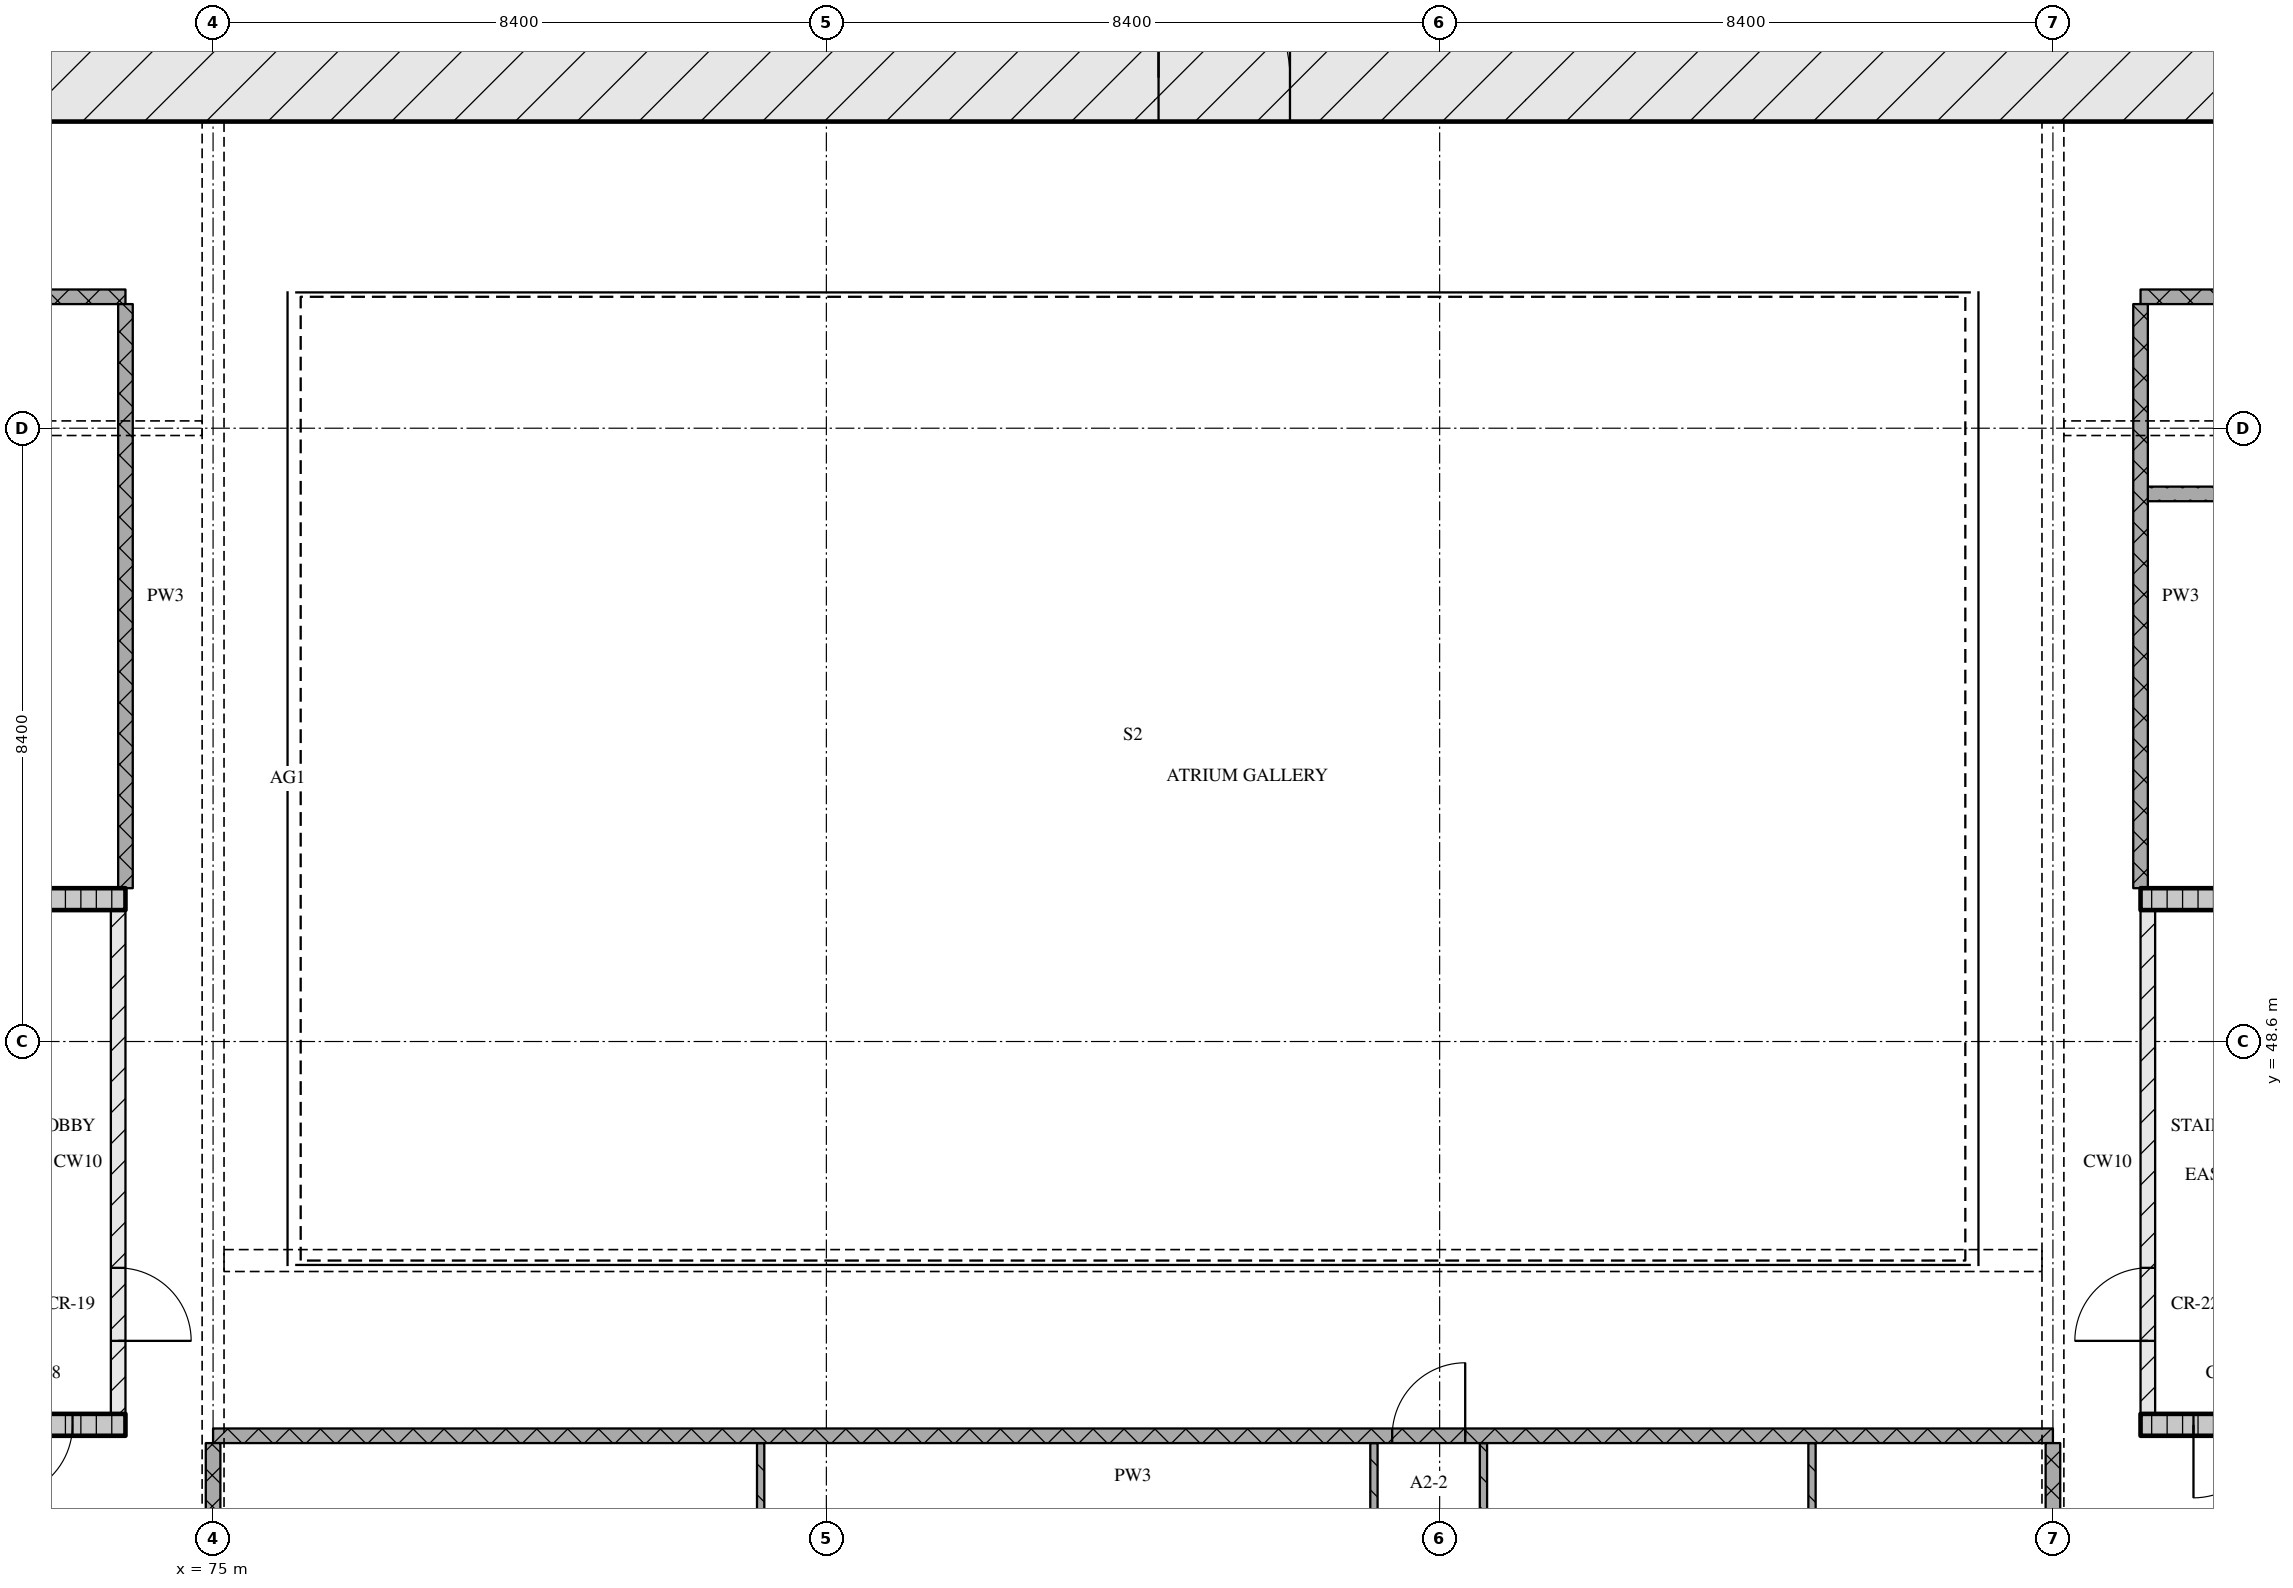
"""IFC4 building model, lengths in metres.
Left out: names, types, materials, properties, quantities, classifications, styles, units other than length and angle.
Written with IfcOpenShell. Run it as: python <this file> out.ifc"""

import sys

from ifc_helpers import new_model, si_unit, direction, frame, frame_2d, origin, place, context, subcontext, project, spatial, rectangle, extrude, element, fill, save


model = new_model("IFC4")
c1 = context("Model", 3, precision=1e-05, world=origin(), true_north=direction((0.0, 1.0)))
c2 = subcontext(c1, "Body", "Model", "MODEL_VIEW")
j1 = project(units=[si_unit("LENGTHUNIT", "METRE"), si_unit("PLANEANGLEUNIT", "RADIAN")], contexts=[c1])
p1 = place(None, origin())
s1 = spatial("IfcSite", under=j1, at=p1, CompositionType="ELEMENT")
p2 = place(p1, origin())
s2 = spatial("IfcBuilding", under=s1, at=p2, CompositionType="ELEMENT")
p3 = place(p2, frame((0.0, 0.0, 55.2)))
s3 = spatial("IfcBuildingStorey", under=s2, at=p3, CompositionType="ELEMENT", Elevation=55.2)
p4 = place(p3, frame((66.6, 61.8, 0.0), z_axis=(0.0, 0.0, 1.0), x_axis=(1.0, 0.0, 0.0)))
e1 = element("IfcWall", 1, at=p4, inside=s3, PredefinedType="SOLIDWALL", context=c2, shape_type="SweptSolid", body=[
    extrude(rectangle(XDim=42.0, YDim=1.2, at=frame_2d((21.0, 0.0))), origin(), (0.0, 0.0, 1.0), 3.32),
])
p5 = place(p4, frame((21.35, 0.0, 0.0)))
e2 = element("IfcOpeningElement", 2, at=p5, cuts=e1, PredefinedType="OPENING", context=c2, shape_type="SweptSolid", body=[
    extrude(rectangle(XDim=1.8, YDim=2.1, at=frame_2d((0.9, 1.05))), frame((0.0, 0.61, 0.0), z_axis=(0.0, -1.0, 0.0), x_axis=(1.0, 0.0, 0.0)), (0.0, 0.0, 1.0), 1.22),
])
p6 = place(p3, frame((68.2, 43.35, 0.0), z_axis=(0.0, 0.0, 1.0), x_axis=(1.0, 0.0, 0.0)))
e3 = element("IfcWall", 3, at=p6, inside=s3, PredefinedType="SOLIDWALL", context=c2, shape_type="SweptSolid", body=[
    extrude(rectangle(XDim=5.6, YDim=0.3, at=frame_2d((2.8, 0.0))), origin(), (0.0, 0.0, 1.0), 3.32),
])
p7 = place(p6, frame((3.875, 0.0, 0.0)))
e4 = element("IfcOpeningElement", 4, at=p7, cuts=e3, PredefinedType="OPENING", context=c2, shape_type="SweptSolid", body=[
    extrude(rectangle(XDim=1.0, YDim=2.1, at=frame_2d((0.5, 1.05))), frame((0.0, 0.16, 0.0), z_axis=(0.0, -1.0, 0.0), x_axis=(1.0, 0.0, 0.0)), (0.0, 0.0, 1.0), 0.32),
])
p8 = place(p3, frame((73.7, 43.5, 0.0), z_axis=(0.0, 0.0, 1.0), x_axis=(0.0, 1.0, 0.0)))
e5 = element("IfcWall", 5, at=p8, inside=s3, PredefinedType="PARTITIONING", context=c2, shape_type="SweptSolid", body=[
    extrude(rectangle(XDim=6.9, YDim=0.2, at=frame_2d((3.45, 0.0))), origin(), (0.0, 0.0, 1.0), 3.32),
])
p9 = place(p8, frame((1.0, 0.0, 0.0)))
e6 = element("IfcOpeningElement", 6, at=p9, cuts=e5, PredefinedType="OPENING", context=c2, shape_type="SweptSolid", body=[
    extrude(rectangle(XDim=1.0, YDim=2.1, at=frame_2d((0.5, 1.05))), frame((0.0, 0.11, 0.0), z_axis=(0.0, -1.0, 0.0), x_axis=(1.0, 0.0, 0.0)), (0.0, 0.0, 1.0), 0.22),
])
p10 = place(p3, frame((68.2, 50.55, 0.0), z_axis=(0.0, 0.0, 1.0), x_axis=(1.0, 0.0, 0.0)))
e7 = element("IfcWall", 7, at=p10, inside=s3, PredefinedType="SOLIDWALL", context=c2, shape_type="SweptSolid", body=[
    extrude(rectangle(XDim=5.6, YDim=0.3, at=frame_2d((2.8, 0.0))), origin(), (0.0, 0.0, 1.0), 3.32),
])
p11 = place(p3, frame((101.4, 43.35, 0.0), z_axis=(0.0, 0.0, 1.0), x_axis=(1.0, 0.0, 0.0)))
e8 = element("IfcWall", 8, at=p11, inside=s3, PredefinedType="SOLIDWALL", context=c2, shape_type="SweptSolid", body=[
    extrude(rectangle(XDim=5.6, YDim=0.3, at=frame_2d((2.8, 0.0))), origin(), (0.0, 0.0, 1.0), 3.32),
])
p12 = place(p11, frame((0.725, 0.0, 0.0)))
e9 = element("IfcOpeningElement", 9, at=p12, cuts=e8, PredefinedType="OPENING", context=c2, shape_type="SweptSolid", body=[
    extrude(rectangle(XDim=1.0, YDim=2.1, at=frame_2d((0.5, 1.05))), frame((0.0, 0.16, 0.0), z_axis=(0.0, -1.0, 0.0), x_axis=(1.0, 0.0, 0.0)), (0.0, 0.0, 1.0), 0.32),
])
p13 = place(p3, frame((101.5, 43.5, 0.0), z_axis=(0.0, 0.0, 1.0), x_axis=(0.0, 1.0, 0.0)))
e10 = element("IfcWall", 10, at=p13, inside=s3, PredefinedType="PARTITIONING", context=c2, shape_type="SweptSolid", body=[
    extrude(rectangle(XDim=6.9, YDim=0.2, at=frame_2d((3.45, 0.0))), origin(), (0.0, 0.0, 1.0), 3.32),
])
p14 = place(p13, frame((1.0, 0.0, 0.0)))
e11 = element("IfcOpeningElement", 11, at=p14, cuts=e10, PredefinedType="OPENING", context=c2, shape_type="SweptSolid", body=[
    extrude(rectangle(XDim=1.0, YDim=2.1, at=frame_2d((0.5, 1.05))), frame((0.0, 0.11, 0.0), z_axis=(0.0, -1.0, 0.0), x_axis=(1.0, 0.0, 0.0)), (0.0, 0.0, 1.0), 0.22),
])
p15 = place(p3, frame((101.4, 50.55, 0.0), z_axis=(0.0, 0.0, 1.0), x_axis=(1.0, 0.0, 0.0)))
e12 = element("IfcWall", 12, at=p15, inside=s3, PredefinedType="SOLIDWALL", context=c2, shape_type="SweptSolid", body=[
    extrude(rectangle(XDim=5.6, YDim=0.3, at=frame_2d((2.8, 0.0))), origin(), (0.0, 0.0, 1.0), 3.32),
])
p16 = place(p3, frame((100.2, 43.2, 0.0), z_axis=(0.0, 0.0, 1.0), x_axis=(-1.0, 0.0, 0.0)))
e13 = element("IfcWall", 13, at=p16, inside=s3, PredefinedType="PARTITIONING", context=c2, shape_type="SweptSolid", body=[
    extrude(rectangle(XDim=25.2, YDim=0.2, at=frame_2d((12.6, 0.0))), origin(), (0.0, 0.0, 1.0), 3.32),
])
p17 = place(p16, frame((8.05, 0.0, 0.0)))
e14 = element("IfcOpeningElement", 14, at=p17, cuts=e13, PredefinedType="OPENING", context=c2, shape_type="SweptSolid", body=[
    extrude(rectangle(XDim=1.0, YDim=2.1, at=frame_2d((0.5, 1.05))), frame((0.0, 0.11, 0.0), z_axis=(0.0, -1.0, 0.0), x_axis=(1.0, 0.0, 0.0)), (0.0, 0.0, 1.0), 0.22),
])
p18 = place(p3, frame((101.5, 56.1, 0.0), z_axis=(0.0, 0.0, 1.0), x_axis=(1.0, 0.0, 0.0)))
e15 = element("IfcWall", 15, at=p18, inside=s3, PredefinedType="PARTITIONING", context=c2, shape_type="SweptSolid", body=[
    extrude(rectangle(XDim=7.0, YDim=0.2, at=frame_2d((3.5, 0.0))), origin(), (0.0, 0.0, 1.0), 3.32),
])
p19 = place(p3, frame((73.8, 58.8, 0.0), z_axis=(0.0, 0.0, 1.0), x_axis=(-1.0, 0.0, 0.0)))
e16 = element("IfcWall", 16, at=p19, inside=s3, PredefinedType="PARTITIONING", context=c2, shape_type="SweptSolid", body=[
    extrude(rectangle(XDim=7.2, YDim=0.2, at=frame_2d((3.6, 0.0))), origin(), (0.0, 0.0, 1.0), 3.32),
])
p20 = place(p19, frame((3.0, 0.0, 0.0)))
e17 = element("IfcOpeningElement", 17, at=p20, cuts=e16, PredefinedType="OPENING", context=c2, shape_type="SweptSolid", body=[
    extrude(rectangle(XDim=1.2, YDim=2.1, at=frame_2d((0.6, 1.05))), frame((0.0, 0.11, 0.0), z_axis=(0.0, -1.0, 0.0), x_axis=(1.0, 0.0, 0.0)), (0.0, 0.0, 1.0), 0.22),
])
p21 = place(p3, frame((101.4, 58.8, 0.0), z_axis=(0.0, 0.0, 1.0), x_axis=(1.0, 0.0, 0.0)))
e18 = element("IfcWall", 18, at=p21, inside=s3, PredefinedType="PARTITIONING", context=c2, shape_type="SweptSolid", body=[
    extrude(rectangle(XDim=7.2, YDim=0.2, at=frame_2d((3.6, 0.0))), origin(), (0.0, 0.0, 1.0), 3.32),
])
p22 = place(p3, frame((73.8, 58.7, 0.0), z_axis=(0.0, 0.0, 1.0), x_axis=(0.0, -1.0, 0.0)))
e19 = element("IfcWall", 19, at=p22, inside=s3, PredefinedType="PARTITIONING", context=c2, shape_type="SweptSolid", body=[
    extrude(rectangle(XDim=8.0, YDim=0.2, at=frame_2d((4.0, 0.0))), origin(), (0.0, 0.0, 1.0), 3.32),
])
p23 = place(p3, frame((75.0, 43.1, 0.0), z_axis=(0.0, 0.0, 1.0), x_axis=(0.0, -1.0, 0.0)))
e20 = element("IfcWall", 20, at=p23, inside=s3, PredefinedType="PARTITIONING", context=c2, shape_type="SweptSolid", body=[
    extrude(rectangle(XDim=2.2, YDim=0.2, at=frame_2d((1.1, 0.0))), origin(), (0.0, 0.0, 1.0), 2.43),
])
p24 = place(p3, frame((82.5, 43.1, 0.0), z_axis=(0.0, 0.0, 1.0), x_axis=(0.0, -1.0, 0.0)))
e21 = element("IfcWall", 21, at=p24, inside=s3, PredefinedType="PARTITIONING", context=c2, shape_type="SweptSolid", body=[
    extrude(rectangle(XDim=4.95, YDim=0.1, at=frame_2d((2.475, 0.0))), origin(), (0.0, 0.0, 1.0), 3.32),
])
p25 = place(p3, frame((90.9, 38.15, 0.0), z_axis=(0.0, 0.0, 1.0), x_axis=(0.0, 1.0, 0.0)))
e22 = element("IfcWall", 22, at=p25, inside=s3, PredefinedType="PARTITIONING", context=c2, shape_type="SweptSolid", body=[
    extrude(rectangle(XDim=4.95, YDim=0.1, at=frame_2d((2.475, 0.0))), origin(), (0.0, 0.0, 1.0), 3.32),
])
p26 = place(p25, frame((2.65, 0.0, 0.0)))
e23 = element("IfcOpeningElement", 23, at=p26, cuts=e22, PredefinedType="OPENING", context=c2, shape_type="SweptSolid", body=[
    extrude(rectangle(XDim=0.9, YDim=2.1, at=frame_2d((0.45, 1.05))), frame((0.0, 0.06, 0.0), z_axis=(0.0, -1.0, 0.0), x_axis=(1.0, 0.0, 0.0)), (0.0, 0.0, 1.0), 0.12),
])
p27 = place(p3, frame((92.4, 43.1, 0.0), z_axis=(0.0, 0.0, 1.0), x_axis=(0.0, -1.0, 0.0)))
e24 = element("IfcWall", 24, at=p27, inside=s3, PredefinedType="PARTITIONING", context=c2, shape_type="SweptSolid", body=[
    extrude(rectangle(XDim=4.95, YDim=0.1, at=frame_2d((2.475, 0.0))), origin(), (0.0, 0.0, 1.0), 3.32),
])
p28 = place(p27, frame((1.6, 0.0, 0.0)))
e25 = element("IfcOpeningElement", 25, at=p28, cuts=e24, PredefinedType="OPENING", context=c2, shape_type="SweptSolid", body=[
    extrude(rectangle(XDim=0.8, YDim=2.1, at=frame_2d((0.4, 1.05))), frame((0.0, 0.06, 0.0), z_axis=(0.0, -1.0, 0.0), x_axis=(1.0, 0.0, 0.0)), (0.0, 0.0, 1.0), 0.12),
])
p29 = place(p3, frame((96.9, 43.1, 0.0), z_axis=(0.0, 0.0, 1.0), x_axis=(0.0, -1.0, 0.0)))
e26 = element("IfcWall", 26, at=p29, inside=s3, PredefinedType="PARTITIONING", context=c2, shape_type="SweptSolid", body=[
    extrude(rectangle(XDim=4.95, YDim=0.1, at=frame_2d((2.475, 0.0))), origin(), (0.0, 0.0, 1.0), 3.32),
])
p30 = place(p3, frame((100.2, 43.1, 0.0), z_axis=(0.0, 0.0, 1.0), x_axis=(0.0, -1.0, 0.0)))
e27 = element("IfcWall", 27, at=p30, inside=s3, PredefinedType="PARTITIONING", context=c2, shape_type="SweptSolid", body=[
    extrude(rectangle(XDim=2.2, YDim=0.2, at=frame_2d((1.1, 0.0))), origin(), (0.0, 0.0, 1.0), 2.43),
])
p31 = place(p3, frame((101.4, 58.7, 0.0), z_axis=(0.0, 0.0, 1.0), x_axis=(0.0, -1.0, 0.0)))
e28 = element("IfcWall", 28, at=p31, inside=s3, PredefinedType="PARTITIONING", context=c2, shape_type="SweptSolid", body=[
    extrude(rectangle(XDim=8.0, YDim=0.2, at=frame_2d((4.0, 0.0))), origin(), (0.0, 0.0, 1.0), 3.32),
])
p32 = place(p5, origin())
e29 = element("IfcDoor", 29, at=p32, inside=s3, OperationType="DOUBLE_DOOR_SINGLE_SWING", PredefinedType="DOOR", context=c2, shape_type="SweptSolid", body=[
    extrude(rectangle(XDim=1.8, YDim=2.1, at=frame_2d((0.9, 1.05))), frame((0.0, 0.025, 0.0), z_axis=(0.0, -1.0, 0.0), x_axis=(1.0, 0.0, 0.0)), (0.0, 0.0, 1.0), 0.05),
])
fill(e2, e29)
p33 = place(p7, origin())
e30 = element("IfcDoor", 30, at=p33, inside=s3, OperationType="SINGLE_SWING_RIGHT", PredefinedType="DOOR", context=c2, shape_type="SweptSolid", body=[
    extrude(rectangle(XDim=1.0, YDim=2.1, at=frame_2d((0.5, 1.05))), frame((0.0, 0.025, 0.0), z_axis=(0.0, -1.0, 0.0), x_axis=(1.0, 0.0, 0.0)), (0.0, 0.0, 1.0), 0.05),
])
fill(e4, e30)
p34 = place(p9, origin())
e31 = element("IfcDoor", 31, at=p34, inside=s3, OperationType="SINGLE_SWING_RIGHT", PredefinedType="DOOR", context=c2, shape_type="SweptSolid", body=[
    extrude(rectangle(XDim=1.0, YDim=2.1, at=frame_2d((0.5, 1.05))), frame((0.0, 0.025, 0.0), z_axis=(0.0, -1.0, 0.0), x_axis=(1.0, 0.0, 0.0)), (0.0, 0.0, 1.0), 0.05),
])
fill(e6, e31)
p35 = place(p12, origin())
e32 = element("IfcDoor", 32, at=p35, inside=s3, OperationType="SINGLE_SWING_RIGHT", PredefinedType="DOOR", context=c2, shape_type="SweptSolid", body=[
    extrude(rectangle(XDim=1.0, YDim=2.1, at=frame_2d((0.5, 1.05))), frame((0.0, 0.025, 0.0), z_axis=(0.0, -1.0, 0.0), x_axis=(1.0, 0.0, 0.0)), (0.0, 0.0, 1.0), 0.05),
])
fill(e9, e32)
p36 = place(p14, origin())
e33 = element("IfcDoor", 33, at=p36, inside=s3, OperationType="SINGLE_SWING_LEFT", PredefinedType="DOOR", context=c2, shape_type="SweptSolid", body=[
    extrude(rectangle(XDim=1.0, YDim=2.1, at=frame_2d((0.5, 1.05))), frame((0.0, 0.025, 0.0), z_axis=(0.0, -1.0, 0.0), x_axis=(1.0, 0.0, 0.0)), (0.0, 0.0, 1.0), 0.05),
])
fill(e11, e33)
p37 = place(p17, origin())
e34 = element("IfcDoor", 34, at=p37, inside=s3, OperationType="SINGLE_SWING_RIGHT", PredefinedType="DOOR", context=c2, shape_type="SweptSolid", body=[
    extrude(rectangle(XDim=1.0, YDim=2.1, at=frame_2d((0.5, 1.05))), frame((0.0, 0.025, 0.0), z_axis=(0.0, -1.0, 0.0), x_axis=(1.0, 0.0, 0.0)), (0.0, 0.0, 1.0), 0.05),
])
fill(e14, e34)
save(model, sys.argv[1])
